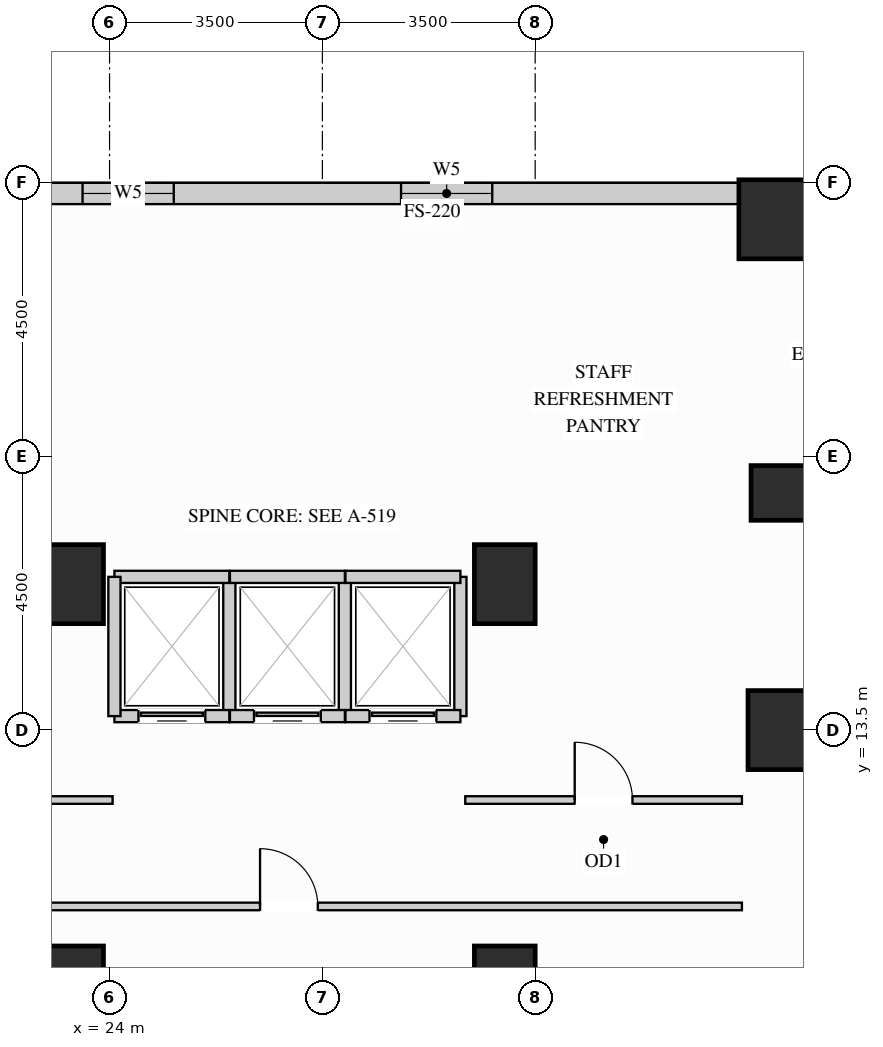
"""IFC4 building model, lengths in metres.
Left out: names, types, materials, properties, quantities, classifications, styles, units other than length and angle.
Written with IfcOpenShell. Run it as: python <this file> out.ifc"""

import sys

from ifc_helpers import new_model, si_unit, direction, frame, frame_2d, origin, origin_2d, place, context, subcontext, project, spatial, rectangle, extrude, source, transform, mapped, element, fill, save


model = new_model("IFC4")
c1 = context("Model", 3, precision=1e-05, world=origin(), true_north=direction((0.0, 1.0)))
c2 = subcontext(c1, "Body", "Model", "MODEL_VIEW")
j1 = project(units=[si_unit("LENGTHUNIT", "METRE"), si_unit("PLANEANGLEUNIT", "RADIAN")], contexts=[c1])
p1 = place(None, origin())
s1 = spatial("IfcSite", under=j1, at=p1, CompositionType="ELEMENT")
p2 = place(p1, origin())
s2 = spatial("IfcBuilding", under=s1, at=p2, CompositionType="ELEMENT")
p3 = place(p2, frame((0.0, 0.0, 33.3)))
s3 = spatial("IfcBuildingStorey", under=s2, at=p3, CompositionType="ELEMENT", Elevation=33.3)
m1 = source(origin(), c2, "Body", "SweptSolid", [
    extrude(rectangle(XDim=0.9, YDim=0.9, at=origin_2d()), origin(), (0.0, 0.0, 1.0), 3.38),
])
p4 = place(p3, frame((35.0, 17.4, 0.0), z_axis=(0.0, 0.0, 1.0), x_axis=(1.0, 0.0, 0.0)))
e1 = element("IfcColumn", 1, at=p4, inside=s3, PredefinedType="COLUMN", context=c2, shape_type="MappedRepresentation", body=[
    mapped(m1, transform((0.0, 0.0, 0.0), x_axis=(1.0, 0.0, 0.0), y_axis=(0.0, 1.0, 0.0), z_axis=(0.0, 0.0, 1.0))),
])
m2 = source(origin(), c2, "Body", "SweptSolid", [
    extrude(rectangle(XDim=1.0, YDim=1.3, at=origin_2d()), origin(), (0.0, 0.0, 1.0), 3.38),
])
for number, where, z_axis, x_axis in (
    (2, (35.0, 13.5, 0.0), (0.0, 0.0, 1.0), (1.0, 0.0, 0.0)),
    (3, (23.4, 15.9, 0.0), (0.0, 0.0, 1.0), (1.0, 0.0, 0.0)),
    (4, (23.4, 9.3, 0.0), (0.0, 0.0, 1.0), (1.0, 0.0, 0.0)),
    (5, (30.5, 15.9, 0.0), (0.0, 0.0, 1.0), (1.0, 0.0, 0.0)),
    (6, (30.5, 9.3, 0.0), (0.0, 0.0, 1.0), (1.0, 0.0, 0.0)),
):
    element("IfcColumn", number, at=place(p3, frame(where, z_axis=z_axis, x_axis=x_axis)), inside=s3, PredefinedType="COLUMN", context=c2, shape_type="MappedRepresentation", body=[
        mapped(m2, transform((0.0, 0.0, 0.0), x_axis=(1.0, 0.0, 0.0), y_axis=(0.0, 1.0, 0.0), z_axis=(0.0, 0.0, 1.0))),
    ])
m3 = source(origin(), c2, "Body", "SweptSolid", [
    extrude(rectangle(XDim=1.3, YDim=1.3, at=origin_2d()), origin(), (0.0, 0.0, 1.0), 3.38),
])
p5 = place(p3, frame((35.0, 21.9, 0.0), z_axis=(0.0, 0.0, 1.0), x_axis=(1.0, 0.0, 0.0)))
e7 = element("IfcColumn", 7, at=p5, inside=s3, PredefinedType="COLUMN", context=c2, shape_type="MappedRepresentation", body=[
    mapped(m3, transform((0.0, 0.0, 0.0), x_axis=(1.0, 0.0, 0.0), y_axis=(0.0, 1.0, 0.0), z_axis=(0.0, 0.0, 1.0))),
])
p6 = place(p3, frame((34.352, 22.325, 0.0), z_axis=(0.0, 0.0, 1.0), x_axis=(-1.0, 0.0, 0.0)))
e8 = element("IfcWall", 8, at=p6, inside=s3, PredefinedType="SOLIDWALL", context=c2, shape_type="SweptSolid", body=[
    extrude(rectangle(XDim=14.854, YDim=0.35, at=frame_2d((7.427, 0.0))), origin(), (0.0, 0.0, 1.0), 3.365),
])
p7 = place(p6, frame((4.058, 0.0, 0.78)))
e9 = element("IfcOpeningElement", 9, at=p7, cuts=e8, PredefinedType="OPENING", context=c2, shape_type="SweptSolid", body=[
    extrude(rectangle(XDim=1.5, YDim=2.0, at=frame_2d((0.75, 1.0))), frame((0.0, 0.185, 0.0), z_axis=(0.0, -1.0, 0.0), x_axis=(1.0, 0.0, 0.0)), (0.0, 0.0, 1.0), 0.37),
])
p8 = place(p6, frame((9.296, 0.0, 0.78)))
e10 = element("IfcOpeningElement", 10, at=p8, cuts=e8, PredefinedType="OPENING", context=c2, shape_type="SweptSolid", body=[
    extrude(rectangle(XDim=1.5, YDim=2.0, at=frame_2d((0.75, 1.0))), frame((0.0, 0.185, 0.0), z_axis=(0.0, -1.0, 0.0), x_axis=(1.0, 0.0, 0.0)), (0.0, 0.0, 1.0), 0.37),
])
p9 = place(p3, frame((29.85, 12.35, 0.0), z_axis=(0.0, 0.0, 1.0), x_axis=(1.0, 0.0, 0.0)))
e11 = element("IfcWall", 11, at=p9, inside=s3, PredefinedType="PARTITIONING", context=c2, shape_type="SweptSolid", body=[
    extrude(rectangle(XDim=4.55, YDim=0.125, at=frame_2d((2.275, 0.0))), origin(), (0.0, 0.0, 1.0), 3.365),
])
p10 = place(p9, frame((1.8, 0.0, 0.0)))
e12 = element("IfcOpeningElement", 12, at=p10, cuts=e11, PredefinedType="OPENING", context=c2, shape_type="SweptSolid", body=[
    extrude(rectangle(XDim=0.95, YDim=2.15, at=frame_2d((0.475, 1.075))), frame((0.0, 0.073, 0.0), z_axis=(0.0, -1.0, 0.0), x_axis=(1.0, 0.0, 0.0)), (0.0, 0.0, 1.0), 0.145),
])
p11 = place(p3, frame((19.5, 12.35, 0.0), z_axis=(0.0, 0.0, 1.0), x_axis=(1.0, 0.0, 0.0)))
e13 = element("IfcWall", 13, at=p11, inside=s3, PredefinedType="PARTITIONING", context=c2, shape_type="SweptSolid", body=[
    extrude(rectangle(XDim=4.55, YDim=0.125, at=frame_2d((2.275, 0.0))), origin(), (0.0, 0.0, 1.0), 3.365),
])
p12 = place(p11, frame((1.8, 0.0, 0.0)))
e14 = element("IfcOpeningElement", 14, at=p12, cuts=e13, PredefinedType="OPENING", context=c2, shape_type="SweptSolid", body=[
    extrude(rectangle(XDim=0.95, YDim=2.15, at=frame_2d((0.475, 1.075))), frame((0.0, 0.073, 0.0), z_axis=(0.0, -1.0, 0.0), x_axis=(1.0, 0.0, 0.0)), (0.0, 0.0, 1.0), 0.145),
])
p13 = place(p3, frame((19.5, 10.6, 0.0), z_axis=(0.0, 0.0, 1.0), x_axis=(1.0, 0.0, 0.0)))
e15 = element("IfcWall", 15, at=p13, inside=s3, PredefinedType="PARTITIONING", context=c2, shape_type="SweptSolid", body=[
    extrude(rectangle(XDim=14.9, YDim=0.125, at=frame_2d((7.45, 0.0))), origin(), (0.0, 0.0, 1.0), 3.365),
])
p14 = place(p13, frame((6.975, 0.0, 0.0)))
e16 = element("IfcOpeningElement", 16, at=p14, cuts=e15, PredefinedType="OPENING", context=c2, shape_type="SweptSolid", body=[
    extrude(rectangle(XDim=0.95, YDim=2.15, at=frame_2d((0.475, 1.075))), frame((0.0, 0.073, 0.0), z_axis=(0.0, -1.0, 0.0), x_axis=(1.0, 0.0, 0.0)), (0.0, 0.0, 1.0), 0.145),
])
m4 = source(origin(), c2, "Body", "SweptSolid", [
    extrude(rectangle(XDim=2.29, YDim=0.2, at=frame_2d((1.145, 0.0))), origin(), (0.0, 0.0, 1.0), 3.365),
])
p15 = place(p3, frame((25.97, 13.73, 0.0), z_axis=(0.0, 0.0, 1.0), x_axis=(0.0, 1.0, 0.0)))
e17 = element("IfcWall", 17, at=p15, inside=s3, PredefinedType="PARTITIONING", context=c2, shape_type="MappedRepresentation", body=[
    mapped(m4, transform((0.0, 0.0, 0.0), x_axis=(1.0, 0.0, 0.0), y_axis=(0.0, 1.0, 0.0), z_axis=(0.0, 0.0, 1.0))),
])
m5 = source(origin(), c2, "Body", "SweptSolid", [
    extrude(rectangle(XDim=1.89, YDim=0.2, at=frame_2d((0.945, 0.0))), origin(), (0.0, 0.0, 1.0), 2.67),
])
p16 = place(p3, frame((24.08, 16.02, 0.0), z_axis=(0.0, 0.0, 1.0), x_axis=(1.0, 0.0, 0.0)))
e18 = element("IfcWall", 18, at=p16, inside=s3, PredefinedType="PARTITIONING", context=c2, shape_type="MappedRepresentation", body=[
    mapped(m5, transform((0.0, 0.0, 0.0), x_axis=(1.0, 0.0, 0.0), y_axis=(0.0, 1.0, 0.0), z_axis=(0.0, 0.0, 1.0))),
])
p17 = place(p3, frame((24.08, 13.73, 0.0), z_axis=(0.0, 0.0, 1.0), x_axis=(1.0, 0.0, 0.0)))
e19 = element("IfcWall", 19, at=p17, inside=s3, PredefinedType="PARTITIONING", context=c2, shape_type="SweptSolid", body=[
    extrude(rectangle(XDim=1.89, YDim=0.2, at=frame_2d((0.945, 0.0))), origin(), (0.0, 0.0, 1.0), 2.446),
])
p18 = place(p17, frame((0.395, 0.0, 0.0)))
e20 = element("IfcOpeningElement", 20, at=p18, cuts=e19, PredefinedType="OPENING", context=c2, shape_type="SweptSolid", body=[
    extrude(rectangle(XDim=1.1, YDim=2.2, at=frame_2d((0.55, 1.1))), frame((0.0, 0.11, 0.0), z_axis=(0.0, -1.0, 0.0), x_axis=(1.0, 0.0, 0.0)), (0.0, 0.0, 1.0), 0.22),
])
for number, where, z_axis, x_axis in (
    (21, (24.08, 13.73, 0.0), (0.0, 0.0, 1.0), (0.0, 1.0, 0.0)),
    (22, (27.87, 13.73, 0.0), (0.0, 0.0, 1.0), (0.0, 1.0, 0.0)),
):
    element("IfcWall", number, at=place(p3, frame(where, z_axis=z_axis, x_axis=x_axis)), inside=s3, PredefinedType="PARTITIONING", context=c2, shape_type="MappedRepresentation", body=[
        mapped(m4, transform((0.0, 0.0, 0.0), x_axis=(1.0, 0.0, 0.0), y_axis=(0.0, 1.0, 0.0), z_axis=(0.0, 0.0, 1.0))),
    ])
m6 = source(origin(), c2, "Body", "SweptSolid", [
    extrude(rectangle(XDim=1.89, YDim=0.2, at=frame_2d((0.945, 0.0))), origin(), (0.0, 0.0, 1.0), 2.67),
])
p19 = place(p3, frame((25.98, 16.02, 0.0), z_axis=(0.0, 0.0, 1.0), x_axis=(1.0, 0.0, 0.0)))
e23 = element("IfcWall", 23, at=p19, inside=s3, PredefinedType="PARTITIONING", context=c2, shape_type="MappedRepresentation", body=[
    mapped(m6, transform((0.0, 0.0, 0.0), x_axis=(1.0, 0.0, 0.0), y_axis=(0.0, 1.0, 0.0), z_axis=(0.0, 0.0, 1.0))),
])
p20 = place(p3, frame((25.98, 13.73, 0.0), z_axis=(0.0, 0.0, 1.0), x_axis=(1.0, 0.0, 0.0)))
e24 = element("IfcWall", 24, at=p20, inside=s3, PredefinedType="PARTITIONING", context=c2, shape_type="SweptSolid", body=[
    extrude(rectangle(XDim=1.89, YDim=0.2, at=frame_2d((0.945, 0.0))), origin(), (0.0, 0.0, 1.0), 2.446),
])
p21 = place(p20, frame((0.395, 0.0, 0.0)))
e25 = element("IfcOpeningElement", 25, at=p21, cuts=e24, PredefinedType="OPENING", context=c2, shape_type="SweptSolid", body=[
    extrude(rectangle(XDim=1.1, YDim=2.2, at=frame_2d((0.55, 1.1))), frame((0.0, 0.11, 0.0), z_axis=(0.0, -1.0, 0.0), x_axis=(1.0, 0.0, 0.0)), (0.0, 0.0, 1.0), 0.22),
])
p22 = place(p3, frame((29.77, 13.73, 0.0), z_axis=(0.0, 0.0, 1.0), x_axis=(0.0, 1.0, 0.0)))
e26 = element("IfcWall", 26, at=p22, inside=s3, PredefinedType="PARTITIONING", context=c2, shape_type="MappedRepresentation", body=[
    mapped(m4, transform((0.0, 0.0, 0.0), x_axis=(1.0, 0.0, 0.0), y_axis=(0.0, 1.0, 0.0), z_axis=(0.0, 0.0, 1.0))),
])
p23 = place(p3, frame((27.88, 16.02, 0.0), z_axis=(0.0, 0.0, 1.0), x_axis=(1.0, 0.0, 0.0)))
e27 = element("IfcWall", 27, at=p23, inside=s3, PredefinedType="PARTITIONING", context=c2, shape_type="MappedRepresentation", body=[
    mapped(m6, transform((0.0, 0.0, 0.0), x_axis=(1.0, 0.0, 0.0), y_axis=(0.0, 1.0, 0.0), z_axis=(0.0, 0.0, 1.0))),
])
p24 = place(p3, frame((27.88, 13.73, 0.0), z_axis=(0.0, 0.0, 1.0), x_axis=(1.0, 0.0, 0.0)))
e28 = element("IfcWall", 28, at=p24, inside=s3, PredefinedType="PARTITIONING", context=c2, shape_type="SweptSolid", body=[
    extrude(rectangle(XDim=1.89, YDim=0.2, at=frame_2d((0.945, 0.0))), origin(), (0.0, 0.0, 1.0), 2.446),
])
p25 = place(p24, frame((0.395, 0.0, 0.0)))
e29 = element("IfcOpeningElement", 29, at=p25, cuts=e28, PredefinedType="OPENING", context=c2, shape_type="SweptSolid", body=[
    extrude(rectangle(XDim=1.1, YDim=2.2, at=frame_2d((0.55, 1.1))), frame((0.0, 0.11, 0.0), z_axis=(0.0, -1.0, 0.0), x_axis=(1.0, 0.0, 0.0)), (0.0, 0.0, 1.0), 0.22),
])
m7 = source(origin(), c2, "Body", "SweptSolid", [
    extrude(rectangle(XDim=1.1, YDim=2.2, at=frame_2d((0.55, 1.1))), frame((0.0, 0.025, 0.0), z_axis=(0.0, -1.0, 0.0), x_axis=(1.0, 0.0, 0.0)), (0.0, 0.0, 1.0), 0.05),
])
p26 = place(p18, origin())
e30 = element("IfcDoor", 30, at=p26, inside=s3, OperationType="SLIDING_TO_LEFT", PredefinedType="DOOR", context=c2, shape_type="MappedRepresentation", body=[
    mapped(m7, transform((0.0, 0.0, 0.0), x_axis=(1.0, 0.0, 0.0), y_axis=(0.0, 1.0, 0.0), z_axis=(0.0, 0.0, 1.0))),
])
fill(e20, e30)
p27 = place(p21, origin())
e31 = element("IfcDoor", 31, at=p27, inside=s3, OperationType="SLIDING_TO_LEFT", PredefinedType="DOOR", context=c2, shape_type="MappedRepresentation", body=[
    mapped(m7, transform((0.0, 0.0, 0.0), x_axis=(1.0, 0.0, 0.0), y_axis=(0.0, 1.0, 0.0), z_axis=(0.0, 0.0, 1.0))),
])
fill(e25, e31)
p28 = place(p25, origin())
e32 = element("IfcDoor", 32, at=p28, inside=s3, OperationType="SLIDING_TO_LEFT", PredefinedType="DOOR", context=c2, shape_type="MappedRepresentation", body=[
    mapped(m7, transform((0.0, 0.0, 0.0), x_axis=(1.0, 0.0, 0.0), y_axis=(0.0, 1.0, 0.0), z_axis=(0.0, 0.0, 1.0))),
])
fill(e29, e32)
m8 = source(origin(), c2, "Body", "SweptSolid", [
    extrude(rectangle(XDim=0.95, YDim=2.15, at=frame_2d((0.475, 1.075))), frame((0.0, 0.025, 0.0), z_axis=(0.0, -1.0, 0.0), x_axis=(1.0, 0.0, 0.0)), (0.0, 0.0, 1.0), 0.05),
])
p29 = place(p10, origin())
e33 = element("IfcDoor", 33, at=p29, inside=s3, OperationType="SINGLE_SWING_LEFT", PredefinedType="DOOR", context=c2, shape_type="MappedRepresentation", body=[
    mapped(m8, transform((0.0, 0.0, 0.0), x_axis=(1.0, 0.0, 0.0), y_axis=(0.0, 1.0, 0.0), z_axis=(0.0, 0.0, 1.0))),
])
fill(e12, e33)
p30 = place(p14, origin())
e34 = element("IfcDoor", 34, at=p30, inside=s3, OperationType="SINGLE_SWING_LEFT", PredefinedType="DOOR", context=c2, shape_type="MappedRepresentation", body=[
    mapped(m8, transform((0.0, 0.0, 0.0), x_axis=(1.0, 0.0, 0.0), y_axis=(0.0, 1.0, 0.0), z_axis=(0.0, 0.0, 1.0))),
])
fill(e16, e34)
m9 = source(origin(), c2, "Body", "SweptSolid", [
    extrude(rectangle(XDim=1.5, YDim=2.0, at=frame_2d((0.75, 1.0))), frame((0.0, 0.03, 0.0), z_axis=(0.0, -1.0, 0.0), x_axis=(1.0, 0.0, 0.0)), (0.0, 0.0, 1.0), 0.06),
])
p31 = place(p7, origin())
e35 = element("IfcWindow", 35, at=p31, inside=s3, PartitioningType="SINGLE_PANEL", PredefinedType="WINDOW", context=c2, shape_type="MappedRepresentation", body=[
    mapped(m9, transform((0.0, 0.0, 0.0), x_axis=(1.0, 0.0, 0.0), y_axis=(0.0, 1.0, 0.0), z_axis=(0.0, 0.0, 1.0))),
])
fill(e9, e35)
p32 = place(p8, origin())
e36 = element("IfcWindow", 36, at=p32, inside=s3, PartitioningType="SINGLE_PANEL", PredefinedType="WINDOW", context=c2, shape_type="MappedRepresentation", body=[
    mapped(m9, transform((0.0, 0.0, 0.0), x_axis=(1.0, 0.0, 0.0), y_axis=(0.0, 1.0, 0.0), z_axis=(0.0, 0.0, 1.0))),
])
fill(e10, e36)
save(model, sys.argv[1])
